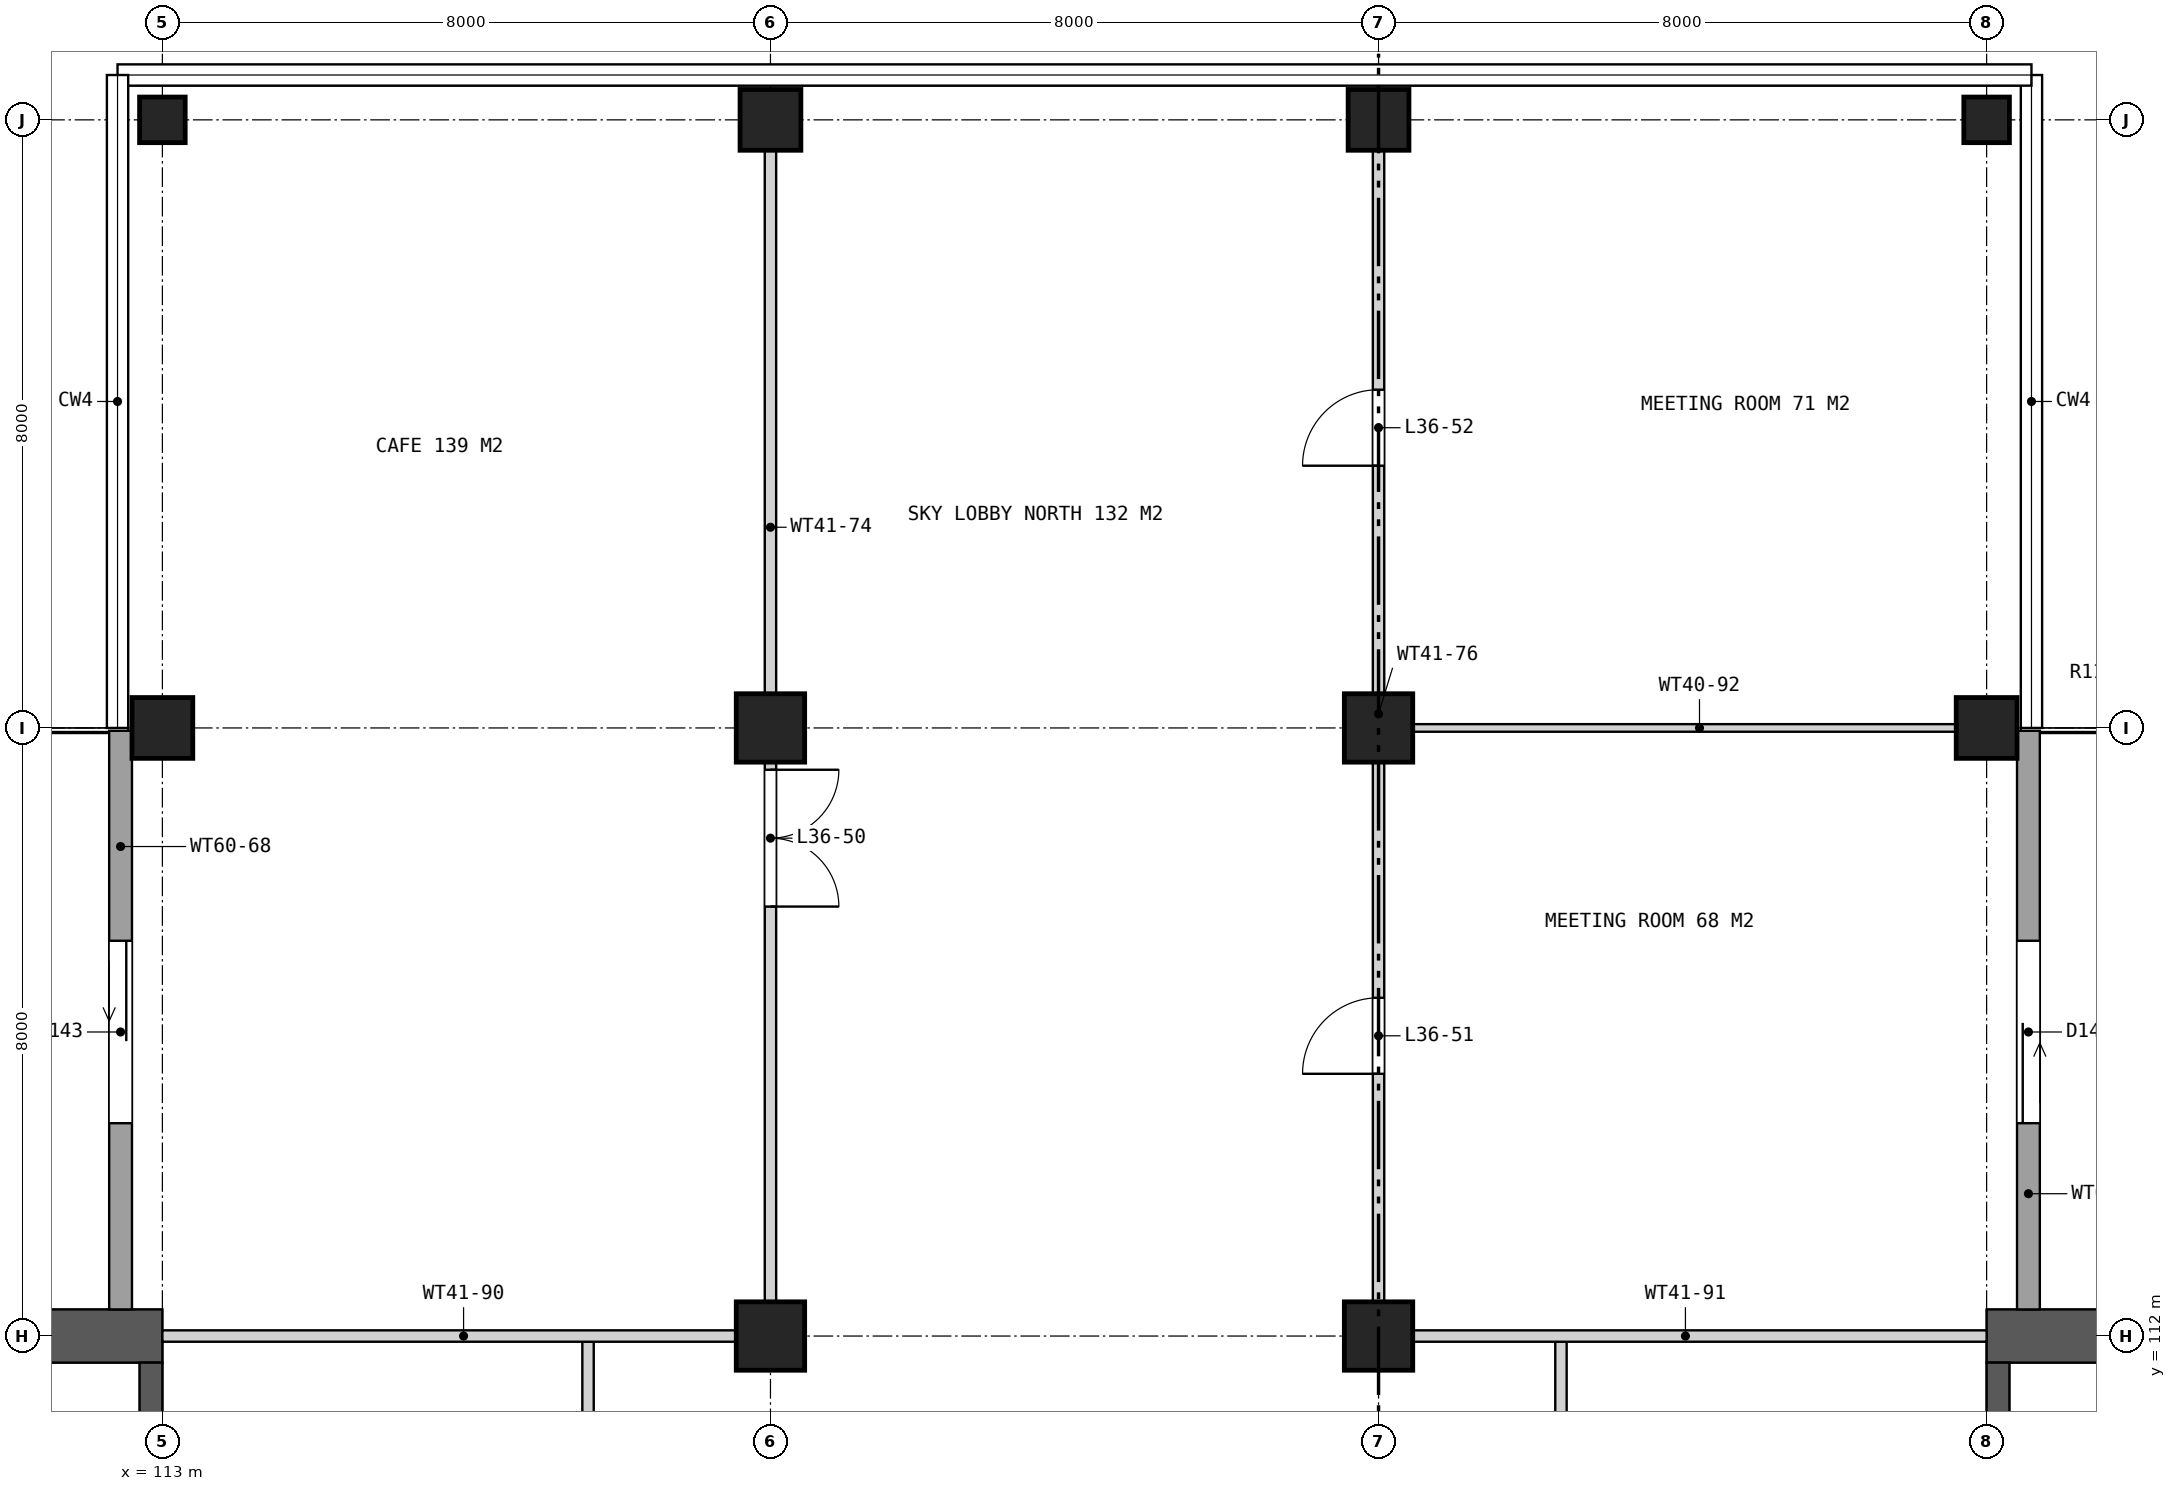
"""IFC4 building model, lengths in metres.
Left out: names, types, materials, properties, quantities, classifications, styles, units other than length and angle.
Written with IfcOpenShell. Run it as: python <this file> out.ifc"""

import sys

from ifc_helpers import new_model, si_unit, direction, frame, frame_2d, origin, origin_2d, place, context, subcontext, project, spatial, rectangle, extrude, element, fill, save


model = new_model("IFC4")
c1 = context("Model", 3, precision=1e-05, world=origin(), true_north=direction((0.0, 1.0)))
c2 = subcontext(c1, "Body", "Model", "MODEL_VIEW")
j1 = project(units=[si_unit("LENGTHUNIT", "METRE"), si_unit("PLANEANGLEUNIT", "RADIAN")], contexts=[c1])
p1 = place(None, origin())
s1 = spatial("IfcSite", under=j1, at=p1, CompositionType="ELEMENT")
p2 = place(p1, origin())
s2 = spatial("IfcBuilding", under=s1, at=p2, CompositionType="ELEMENT")
p3 = place(p2, frame((0.0, 0.0, 171.5)))
s3 = spatial("IfcBuildingStorey", under=s2, at=p3, CompositionType="ELEMENT", Elevation=171.5)
p4 = place(p3, frame((113.0, 120.0, 0.0), z_axis=(0.0, 0.0, 1.0), x_axis=(1.0, 0.0, 0.0)))
e1 = element("IfcColumn", 1, at=p4, inside=s3, PredefinedType="COLUMN", context=c2, shape_type="SweptSolid", body=[
    extrude(rectangle(XDim=0.8, YDim=0.8, at=origin_2d()), origin(), (0.0, 0.0, 1.0), 7.4),
])
p5 = place(p3, frame((113.0, 128.0, 0.0), z_axis=(0.0, 0.0, 1.0), x_axis=(1.0, 0.0, 0.0)))
e2 = element("IfcColumn", 2, at=p5, inside=s3, PredefinedType="COLUMN", context=c2, shape_type="SweptSolid", body=[
    extrude(rectangle(XDim=0.6, YDim=0.6, at=origin_2d()), origin(), (0.0, 0.0, 1.0), 7.4),
])
for number, where, z_axis, x_axis in (
    (3, (121.0, 112.0, 0.0), (0.0, 0.0, 1.0), (1.0, 0.0, 0.0)),
    (4, (121.0, 120.0, 0.0), (0.0, 0.0, 1.0), (1.0, 0.0, 0.0)),
):
    element("IfcColumn", number, at=place(p3, frame(where, z_axis=z_axis, x_axis=x_axis)), inside=s3, PredefinedType="COLUMN", context=c2, shape_type="SweptSolid", body=[
        extrude(rectangle(XDim=0.9, YDim=0.9, at=origin_2d()), origin(), (0.0, 0.0, 1.0), 7.4),
    ])
p6 = place(p3, frame((121.0, 128.0, 0.0), z_axis=(0.0, 0.0, 1.0), x_axis=(1.0, 0.0, 0.0)))
e5 = element("IfcColumn", 5, at=p6, inside=s3, PredefinedType="COLUMN", context=c2, shape_type="SweptSolid", body=[
    extrude(rectangle(XDim=0.8, YDim=0.8, at=origin_2d()), origin(), (0.0, 0.0, 1.0), 7.4),
])
for number, where, z_axis, x_axis in (
    (6, (129.0, 112.0, 0.0), (0.0, 0.0, 1.0), (1.0, 0.0, 0.0)),
    (7, (129.0, 120.0, 0.0), (0.0, 0.0, 1.0), (1.0, 0.0, 0.0)),
):
    element("IfcColumn", number, at=place(p3, frame(where, z_axis=z_axis, x_axis=x_axis)), inside=s3, PredefinedType="COLUMN", context=c2, shape_type="SweptSolid", body=[
        extrude(rectangle(XDim=0.9, YDim=0.9, at=origin_2d()), origin(), (0.0, 0.0, 1.0), 7.4),
    ])
for number, where, z_axis, x_axis in (
    (8, (129.0, 128.0, 0.0), (0.0, 0.0, 1.0), (1.0, 0.0, 0.0)),
    (9, (137.0, 120.0, 0.0), (0.0, 0.0, 1.0), (1.0, 0.0, 0.0)),
):
    element("IfcColumn", number, at=place(p3, frame(where, z_axis=z_axis, x_axis=x_axis)), inside=s3, PredefinedType="COLUMN", context=c2, shape_type="SweptSolid", body=[
        extrude(rectangle(XDim=0.8, YDim=0.8, at=origin_2d()), origin(), (0.0, 0.0, 1.0), 7.4),
    ])
p7 = place(p3, frame((137.0, 128.0, 0.0), z_axis=(0.0, 0.0, 1.0), x_axis=(1.0, 0.0, 0.0)))
e10 = element("IfcColumn", 10, at=p7, inside=s3, PredefinedType="COLUMN", context=c2, shape_type="SweptSolid", body=[
    extrude(rectangle(XDim=0.6, YDim=0.6, at=origin_2d()), origin(), (0.0, 0.0, 1.0), 7.4),
])
p8 = place(p3, frame((137.0, 112.0, 0.0), z_axis=(0.0, 0.0, 1.0), x_axis=(1.0, 0.0, 0.0)))
e11 = element("IfcWall", 11, at=p8, inside=s3, PredefinedType="SHEAR", context=c2, shape_type="SweptSolid", body=[
    extrude(rectangle(XDim=7.1, YDim=0.7, at=frame_2d((3.55, 0.0))), origin(), (0.0, 0.0, 1.0), 7.4),
])
p9 = place(p3, frame((137.15, 105.7, 0.0), z_axis=(0.0, 0.0, 1.0), x_axis=(0.0, 1.0, 0.0)))
e12 = element("IfcWall", 12, at=p9, inside=s3, PredefinedType="SHEAR", context=c2, shape_type="SweptSolid", body=[
    extrude(rectangle(XDim=5.95, YDim=0.3, at=frame_2d((2.975, 0.0))), origin(), (0.0, 0.0, 1.0), 7.4),
])
p10 = place(p3, frame((113.0, 112.0, 0.0), z_axis=(0.0, 0.0, 1.0), x_axis=(-1.0, 0.0, 0.0)))
e13 = element("IfcWall", 13, at=p10, inside=s3, PredefinedType="SHEAR", context=c2, shape_type="SweptSolid", body=[
    extrude(rectangle(XDim=7.1, YDim=0.7, at=frame_2d((3.55, 0.0))), origin(), (0.0, 0.0, 1.0), 7.4),
])
p11 = place(p3, frame((112.85, 111.65, 0.0), z_axis=(0.0, 0.0, 1.0), x_axis=(0.0, -1.0, 0.0)))
e14 = element("IfcWall", 14, at=p11, inside=s3, PredefinedType="SHEAR", context=c2, shape_type="SweptSolid", body=[
    extrude(rectangle(XDim=5.95, YDim=0.3, at=frame_2d((2.975, 0.0))), origin(), (0.0, 0.0, 1.0), 7.4),
])
p12 = place(p3, frame((137.55, 112.35, 0.0), z_axis=(0.0, 0.0, 1.0), x_axis=(0.0, 1.0, 0.0)))
e15 = element("IfcWall", 15, at=p12, inside=s3, PredefinedType="SOLIDWALL", context=c2, shape_type="SweptSolid", body=[
    extrude(rectangle(XDim=7.612, YDim=0.3, at=frame_2d((3.806, 0.0))), origin(), (0.0, 0.0, 1.0), 7.1),
])
p13 = place(p12, frame((2.45, 0.0, 0.0)))
e16 = element("IfcOpeningElement", 16, at=p13, cuts=e15, PredefinedType="OPENING", context=c2, shape_type="SweptSolid", body=[
    extrude(rectangle(XDim=2.4, YDim=2.4, at=frame_2d((1.2, 1.2))), frame((0.0, 0.16, 0.0), z_axis=(0.0, -1.0, 0.0), x_axis=(1.0, 0.0, 0.0)), (0.0, 0.0, 1.0), 0.32),
])
p14 = place(p3, frame((112.45, 119.962, 0.0), z_axis=(0.0, 0.0, 1.0), x_axis=(0.0, -1.0, 0.0)))
e17 = element("IfcWall", 17, at=p14, inside=s3, PredefinedType="SOLIDWALL", context=c2, shape_type="SweptSolid", body=[
    extrude(rectangle(XDim=7.612, YDim=0.3, at=frame_2d((3.806, 0.0))), origin(), (0.0, 0.0, 1.0), 7.1),
])
p15 = place(p14, frame((2.762, 0.0, 0.0)))
e18 = element("IfcOpeningElement", 18, at=p15, cuts=e17, PredefinedType="OPENING", context=c2, shape_type="SweptSolid", body=[
    extrude(rectangle(XDim=2.4, YDim=2.4, at=frame_2d((1.2, 1.2))), frame((0.0, 0.16, 0.0), z_axis=(0.0, -1.0, 0.0), x_axis=(1.0, 0.0, 0.0)), (0.0, 0.0, 1.0), 0.32),
])
p16 = place(p3, frame((118.6, 106.0, 0.0), z_axis=(0.0, 0.0, 1.0), x_axis=(0.0, 1.0, 0.0)))
e19 = element("IfcWall", 19, at=p16, inside=s3, PredefinedType="PARTITIONING", context=c2, shape_type="SweptSolid", body=[
    extrude(rectangle(XDim=5.925, YDim=0.15, at=frame_2d((2.962, 0.0))), origin(), (0.0, 0.0, 1.0), 6.64),
])
p17 = place(p16, frame((2.45, 0.0, 0.0)))
e20 = element("IfcOpeningElement", 20, at=p17, cuts=e19, PredefinedType="OPENING", context=c2, shape_type="SweptSolid", body=[
    extrude(rectangle(XDim=1.0, YDim=2.1, at=frame_2d((0.5, 1.05))), frame((0.0, 0.085, 0.0), z_axis=(0.0, -1.0, 0.0), x_axis=(1.0, 0.0, 0.0)), (0.0, 0.0, 1.0), 0.17),
])
p18 = place(p3, frame((121.0, 112.0, 0.0), z_axis=(0.0, 0.0, 1.0), x_axis=(0.0, 1.0, 0.0)))
e21 = element("IfcWall", 21, at=p18, inside=s3, PredefinedType="PARTITIONING", context=c2, shape_type="SweptSolid", body=[
    extrude(rectangle(XDim=16.37, YDim=0.15, at=frame_2d((8.185, 0.0))), origin(), (0.0, 0.0, 1.0), 6.64),
])
p19 = place(p18, frame((5.65, 0.0, 0.0)))
e22 = element("IfcOpeningElement", 22, at=p19, cuts=e21, PredefinedType="OPENING", context=c2, shape_type="SweptSolid", body=[
    extrude(rectangle(XDim=1.8, YDim=2.1, at=frame_2d((0.9, 1.05))), frame((0.0, 0.085, 0.0), z_axis=(0.0, -1.0, 0.0), x_axis=(1.0, 0.0, 0.0)), (0.0, 0.0, 1.0), 0.17),
])
p20 = place(p3, frame((129.0, 112.0, 0.0), z_axis=(0.0, 0.0, 1.0), x_axis=(0.0, 1.0, 0.0)))
e23 = element("IfcWall", 23, at=p20, inside=s3, PredefinedType="PARTITIONING", context=c2, shape_type="SweptSolid", body=[
    extrude(rectangle(XDim=16.37, YDim=0.15, at=frame_2d((8.185, 0.0))), origin(), (0.0, 0.0, 1.0), 6.64),
])
p21 = place(p20, frame((3.45, 0.0, 0.0)))
e24 = element("IfcOpeningElement", 24, at=p21, cuts=e23, PredefinedType="OPENING", context=c2, shape_type="SweptSolid", body=[
    extrude(rectangle(XDim=1.0, YDim=2.1, at=frame_2d((0.5, 1.05))), frame((0.0, 0.085, 0.0), z_axis=(0.0, -1.0, 0.0), x_axis=(1.0, 0.0, 0.0)), (0.0, 0.0, 1.0), 0.17),
])
p22 = place(p20, frame((11.45, 0.0, 0.0)))
e25 = element("IfcOpeningElement", 25, at=p22, cuts=e23, PredefinedType="OPENING", context=c2, shape_type="SweptSolid", body=[
    extrude(rectangle(XDim=1.0, YDim=2.1, at=frame_2d((0.5, 1.05))), frame((0.0, 0.085, 0.0), z_axis=(0.0, -1.0, 0.0), x_axis=(1.0, 0.0, 0.0)), (0.0, 0.0, 1.0), 0.17),
])
p23 = place(p3, frame((131.4, 106.0, 0.0), z_axis=(0.0, 0.0, 1.0), x_axis=(0.0, 1.0, 0.0)))
e26 = element("IfcWall", 26, at=p23, inside=s3, PredefinedType="PARTITIONING", context=c2, shape_type="SweptSolid", body=[
    extrude(rectangle(XDim=5.925, YDim=0.15, at=frame_2d((2.962, 0.0))), origin(), (0.0, 0.0, 1.0), 6.64),
])
p24 = place(p23, frame((2.45, 0.0, 0.0)))
e27 = element("IfcOpeningElement", 27, at=p24, cuts=e26, PredefinedType="OPENING", context=c2, shape_type="SweptSolid", body=[
    extrude(rectangle(XDim=1.0, YDim=2.1, at=frame_2d((0.5, 1.05))), frame((0.0, 0.085, 0.0), z_axis=(0.0, -1.0, 0.0), x_axis=(1.0, 0.0, 0.0)), (0.0, 0.0, 1.0), 0.17),
])
for number, where, z_axis, x_axis in (
    (28, (113.0, 112.0, 0.0), (0.0, 0.0, 1.0), (1.0, 0.0, 0.0)),
    (29, (129.075, 112.0, 0.0), (0.0, 0.0, 1.0), (1.0, 0.0, 0.0)),
):
    element("IfcWall", number, at=place(p3, frame(where, z_axis=z_axis, x_axis=x_axis)), inside=s3, PredefinedType="PARTITIONING", context=c2, shape_type="SweptSolid", body=[
        extrude(rectangle(XDim=7.925, YDim=0.15, at=frame_2d((3.962, 0.0))), origin(), (0.0, 0.0, 1.0), 6.64),
    ])
p25 = place(p3, frame((129.075, 120.0, 0.0), z_axis=(0.0, 0.0, 1.0), x_axis=(1.0, 0.0, 0.0)))
e30 = element("IfcWall", 30, at=p25, inside=s3, PredefinedType="PARTITIONING", context=c2, shape_type="SweptSolid", body=[
    extrude(rectangle(XDim=8.295, YDim=0.1, at=frame_2d((4.147, 0.0))), origin(), (0.0, 0.0, 1.0), 6.64),
])
p26 = place(p13, frame((2.4, 0.0, 0.0), z_axis=(0.0, 0.0, 1.0), x_axis=(-1.0, 0.0, 0.0)))
e31 = element("IfcDoor", 31, at=p26, inside=s3, OperationType="SLIDING_TO_LEFT", PredefinedType="DOOR", context=c2, shape_type="SweptSolid", body=[
    extrude(rectangle(XDim=2.4, YDim=2.4, at=frame_2d((1.2, 1.2))), frame((0.0, 0.025, 0.0), z_axis=(0.0, -1.0, 0.0), x_axis=(1.0, 0.0, 0.0)), (0.0, 0.0, 1.0), 0.05),
])
fill(e16, e31)
p27 = place(p15, frame((2.4, 0.0, 0.0), z_axis=(0.0, 0.0, 1.0), x_axis=(-1.0, 0.0, 0.0)))
e32 = element("IfcDoor", 32, at=p27, inside=s3, OperationType="SLIDING_TO_LEFT", PredefinedType="DOOR", context=c2, shape_type="SweptSolid", body=[
    extrude(rectangle(XDim=2.4, YDim=2.4, at=frame_2d((1.2, 1.2))), frame((0.0, 0.025, 0.0), z_axis=(0.0, -1.0, 0.0), x_axis=(1.0, 0.0, 0.0)), (0.0, 0.0, 1.0), 0.05),
])
fill(e18, e32)
p28 = place(p19, frame((1.8, 0.0, 0.0), z_axis=(0.0, 0.0, 1.0), x_axis=(-1.0, 0.0, 0.0)))
e33 = element("IfcDoor", 33, at=p28, inside=s3, OperationType="DOUBLE_DOOR_SINGLE_SWING", PredefinedType="DOOR", context=c2, shape_type="SweptSolid", body=[
    extrude(rectangle(XDim=1.8, YDim=2.1, at=frame_2d((0.9, 1.05))), frame((0.0, 0.025, 0.0), z_axis=(0.0, -1.0, 0.0), x_axis=(1.0, 0.0, 0.0)), (0.0, 0.0, 1.0), 0.05),
])
fill(e22, e33)
p29 = place(p21, origin())
e34 = element("IfcDoor", 34, at=p29, inside=s3, OperationType="SINGLE_SWING_LEFT", PredefinedType="DOOR", context=c2, shape_type="SweptSolid", body=[
    extrude(rectangle(XDim=1.0, YDim=2.1, at=frame_2d((0.5, 1.05))), frame((0.0, 0.025, 0.0), z_axis=(0.0, -1.0, 0.0), x_axis=(1.0, 0.0, 0.0)), (0.0, 0.0, 1.0), 0.05),
])
fill(e24, e34)
p30 = place(p22, origin())
e35 = element("IfcDoor", 35, at=p30, inside=s3, OperationType="SINGLE_SWING_LEFT", PredefinedType="DOOR", context=c2, shape_type="SweptSolid", body=[
    extrude(rectangle(XDim=1.0, YDim=2.1, at=frame_2d((0.5, 1.05))), frame((0.0, 0.025, 0.0), z_axis=(0.0, -1.0, 0.0), x_axis=(1.0, 0.0, 0.0)), (0.0, 0.0, 1.0), 0.05),
])
fill(e25, e35)
save(model, sys.argv[1])
